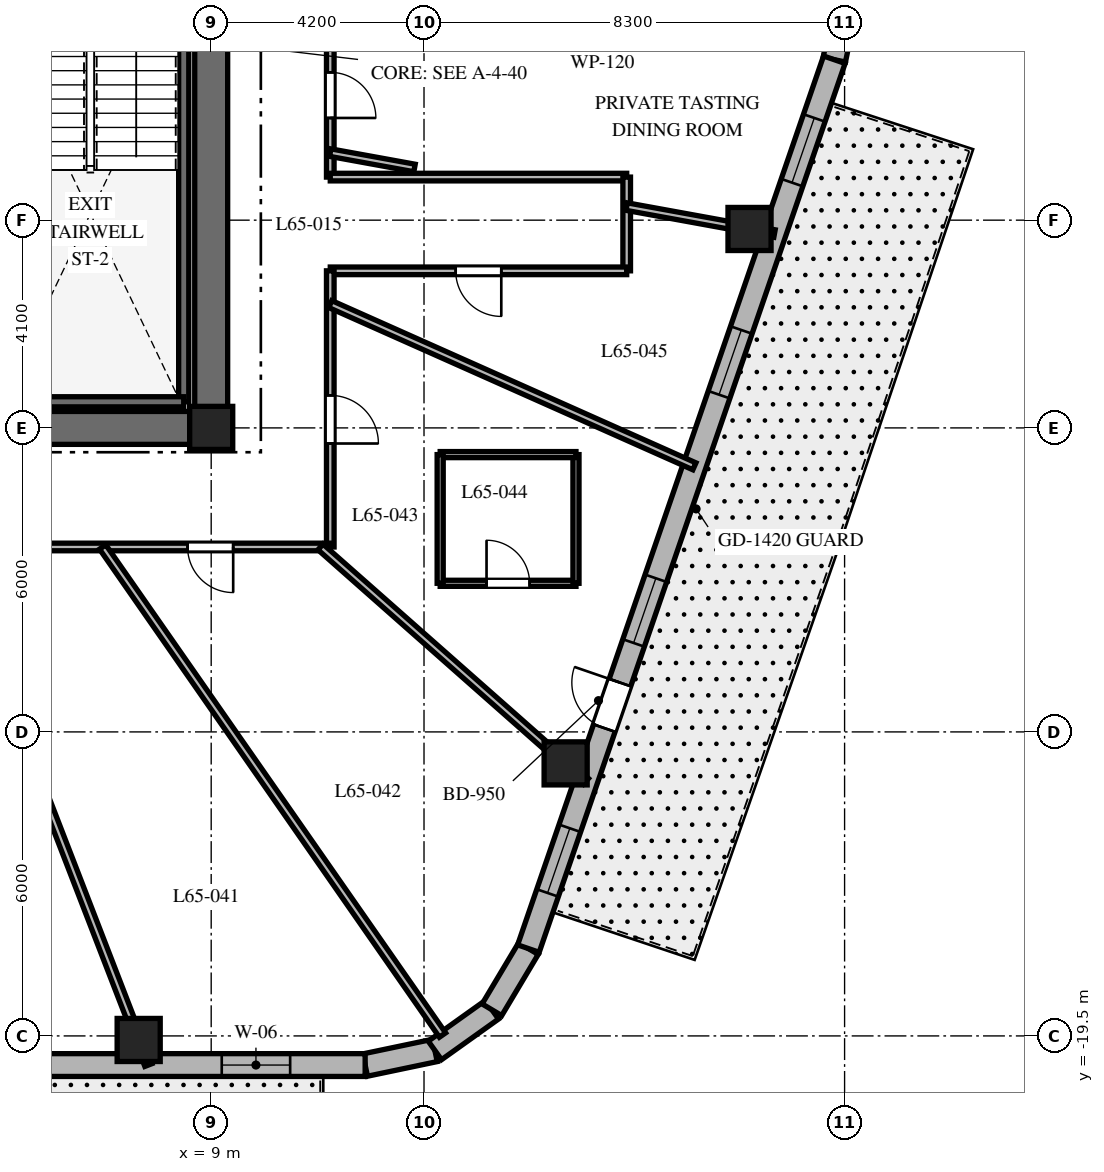
"""IFC4 building model, lengths in metres.
Left out: names, types, materials, properties, quantities, classifications, styles, units other than length and angle.
Written with IfcOpenShell. Run it as: python <this file> out.ifc"""

import sys

from ifc_helpers import new_model, si_unit, direction, frame, frame_2d, origin, origin_2d, place, context, subcontext, project, spatial, rectangle, extrude, element, fill, save


model = new_model("IFC4")
c1 = context("Model", 3, precision=1e-05, world=origin(), true_north=direction((0.0, 1.0)))
c2 = subcontext(c1, "Body", "Model", "MODEL_VIEW")
j1 = project(units=[si_unit("LENGTHUNIT", "METRE"), si_unit("PLANEANGLEUNIT", "RADIAN")], contexts=[c1])
p1 = place(None, origin())
s1 = spatial("IfcSite", under=j1, at=p1, CompositionType="ELEMENT")
p2 = place(p1, origin())
s2 = spatial("IfcBuilding", under=s1, at=p2, CompositionType="ELEMENT")
p3 = place(p2, frame((0.0, 0.0, 261.3)))
s3 = spatial("IfcBuildingStorey", under=s2, at=p3, CompositionType="ELEMENT", Elevation=261.3)
p4 = place(p3, frame((-9.325, -7.5, 0.0), z_axis=(0.0, 0.0, 1.0), x_axis=(1.0, 0.0, 0.0)))
e1 = element("IfcWall", 1, at=p4, inside=s3, PredefinedType="SHEAR", context=c2, shape_type="SweptSolid", body=[
    extrude(rectangle(XDim=18.65, YDim=0.65, at=frame_2d((9.325, 0.0))), origin(), (0.0, 0.0, 1.0), 3.9),
])
p5 = place(p4, frame((9.375, 0.0, 0.0)))
e2 = element("IfcOpeningElement", 2, at=p5, cuts=e1, PredefinedType="OPENING", context=c2, shape_type="SweptSolid", body=[
    extrude(rectangle(XDim=1.0, YDim=2.15, at=frame_2d((0.5, 1.075))), frame((0.0, 0.335, 0.0), z_axis=(0.0, -1.0, 0.0), x_axis=(1.0, 0.0, 0.0)), (0.0, 0.0, 1.0), 0.67),
])
p6 = place(p3, frame((9.0, -7.175, 0.0), z_axis=(0.0, 0.0, 1.0), x_axis=(0.0, 1.0, 0.0)))
e3 = element("IfcWall", 3, at=p6, inside=s3, PredefinedType="SHEAR", context=c2, shape_type="SweptSolid", body=[
    extrude(rectangle(XDim=14.35, YDim=0.65, at=frame_2d((7.175, 0.0))), origin(), (0.0, 0.0, 1.0), 3.9),
])
p7 = place(p6, frame((10.3, 0.0, 0.0)))
e4 = element("IfcOpeningElement", 4, at=p7, cuts=e3, PredefinedType="OPENING", context=c2, shape_type="SweptSolid", body=[
    extrude(rectangle(XDim=1.05, YDim=2.15, at=frame_2d((0.525, 1.075))), frame((0.0, 0.335, 0.0), z_axis=(0.0, -1.0, 0.0), x_axis=(1.0, 0.0, 0.0)), (0.0, 0.0, 1.0), 0.67),
])
p8 = place(p3, frame((8.458, -6.985, 0.0), z_axis=(0.0, 0.0, 1.0), x_axis=(0.0, 1.0, 0.0)))
e5 = element("IfcWall", 5, at=p8, inside=s3, PredefinedType="SHEAR", context=c2, shape_type="SweptSolid", body=[
    extrude(rectangle(XDim=9.143, YDim=0.2, at=frame_2d((4.572, 0.0))), origin(), (0.0, 0.0, 1.0), 3.9),
])
p9 = place(p3, frame((4.772, -6.985, 0.0), z_axis=(0.0, 0.0, 1.0), x_axis=(1.0, 0.0, 0.0)))
e6 = element("IfcWall", 6, at=p9, inside=s3, PredefinedType="SHEAR", context=c2, shape_type="SweptSolid", body=[
    extrude(rectangle(XDim=3.686, YDim=0.2, at=frame_2d((1.843, 0.0))), origin(), (0.0, 0.0, 1.0), 3.9),
])
for number, where, z_axis, x_axis in (
    (7, (9.0, -7.5, 0.0), (0.0, 0.0, 1.0), (1.0, 0.0, 0.0)),
    (8, (7.569, -19.58, 0.0), (0.0, 0.0, 1.0), (1.0, 0.0, 0.0)),
    (9, (15.995, -14.121, 0.0), (0.0, 0.0, 1.0), (1.0, 0.0, 0.0)),
    (10, (19.624, -3.574, 0.0), (0.0, 0.0, 1.0), (1.0, 0.0, 0.0)),
):
    element("IfcColumn", number, at=place(p3, frame(where, z_axis=z_axis, x_axis=x_axis)), inside=s3, PredefinedType="COLUMN", context=c2, shape_type="SweptSolid", body=[
        extrude(rectangle(XDim=0.85, YDim=0.85, at=origin_2d()), origin(), (0.0, 0.0, 1.0), 3.9),
    ])
p10 = place(p3, frame((12.038, -20.075, 0.0), z_axis=(0.0, 0.0, 1.0), x_axis=(0.978750122553, 0.205056571711, 0.0)))
e11 = element("IfcWall", 11, at=p10, inside=s3, PredefinedType="SOLIDWALL", context=c2, shape_type="SweptSolid", body=[
    extrude(rectangle(XDim=1.406, YDim=0.45, at=frame_2d((0.703, 0.0))), origin(), (0.0, 0.0, 1.0), 3.6),
])
p11 = place(p3, frame((13.415, -19.787, 0.0), z_axis=(0.0, 0.0, 1.0), x_axis=(0.814055493997, 0.580787097561, 0.0)))
e12 = element("IfcWall", 12, at=p11, inside=s3, PredefinedType="SOLIDWALL", context=c2, shape_type="SweptSolid", body=[
    extrude(rectangle(XDim=1.383, YDim=0.45, at=frame_2d((0.691, 0.0))), origin(), (0.0, 0.0, 1.0), 3.6),
])
p12 = place(p3, frame((14.54, -18.984, 0.0), z_axis=(0.0, 0.0, 1.0), x_axis=(0.512374906623, 0.858761873317, 0.0)))
e13 = element("IfcWall", 13, at=p12, inside=s3, PredefinedType="SOLIDWALL", context=c2, shape_type="SweptSolid", body=[
    extrude(rectangle(XDim=1.406, YDim=0.45, at=frame_2d((0.703, 0.0))), origin(), (0.0, 0.0, 1.0), 3.6),
])
p13 = place(p3, frame((21.298, -0.233, 0.0), z_axis=(0.0, 0.0, 1.0), x_axis=(0.199158176661, 0.979967356941, 0.0)))
e14 = element("IfcWall", 14, at=p13, inside=s3, PredefinedType="SOLIDWALL", context=c2, shape_type="SweptSolid", body=[
    extrude(rectangle(XDim=0.895, YDim=0.45, at=frame_2d((0.447, 0.0))), origin(), (0.0, 0.0, 1.0), 3.6),
])
p14 = place(p3, frame((-10.379, -20.075, 0.0), z_axis=(0.0, 0.0, 1.0), x_axis=(1.0, 0.0, 0.0)))
e15 = element("IfcWall", 15, at=p14, inside=s3, PredefinedType="SOLIDWALL", context=c2, shape_type="SweptSolid", body=[
    extrude(rectangle(XDim=22.417, YDim=0.45, at=frame_2d((11.208, 0.0))), origin(), (0.0, 0.0, 1.0), 3.6),
])
p15 = place(p14, frame((2.302, 0.0, 0.0)))
e16 = element("IfcOpeningElement", 16, at=p15, cuts=e15, PredefinedType="OPENING", context=c2, shape_type="SweptSolid", body=[
    extrude(rectangle(XDim=1.0, YDim=2.15, at=frame_2d((0.5, 1.075))), frame((0.0, 0.235, 0.0), z_axis=(0.0, -1.0, 0.0), x_axis=(1.0, 0.0, 0.0)), (0.0, 0.0, 1.0), 0.47),
])
p16 = place(p14, frame((7.022, 0.0, 0.8)))
e17 = element("IfcOpeningElement", 17, at=p16, cuts=e15, PredefinedType="OPENING", context=c2, shape_type="SweptSolid", body=[
    extrude(rectangle(XDim=1.35, YDim=1.75, at=frame_2d((0.675, 0.875))), frame((0.0, 0.235, 0.0), z_axis=(0.0, -1.0, 0.0), x_axis=(1.0, 0.0, 0.0)), (0.0, 0.0, 1.0), 0.47),
])
p17 = place(p14, frame((13.18, 0.0, 0.8)))
e18 = element("IfcOpeningElement", 18, at=p17, cuts=e15, PredefinedType="OPENING", context=c2, shape_type="SweptSolid", body=[
    extrude(rectangle(XDim=1.35, YDim=1.75, at=frame_2d((0.675, 0.875))), frame((0.0, 0.235, 0.0), z_axis=(0.0, -1.0, 0.0), x_axis=(1.0, 0.0, 0.0)), (0.0, 0.0, 1.0), 0.47),
])
p18 = place(p14, frame((19.587, 0.0, 0.8)))
e19 = element("IfcOpeningElement", 19, at=p18, cuts=e15, PredefinedType="OPENING", context=c2, shape_type="SweptSolid", body=[
    extrude(rectangle(XDim=1.35, YDim=1.75, at=frame_2d((0.675, 0.875))), frame((0.0, 0.235, 0.0), z_axis=(0.0, -1.0, 0.0), x_axis=(1.0, 0.0, 0.0)), (0.0, 0.0, 1.0), 0.47),
])
p19 = place(p3, frame((15.26, -17.776, 0.0), z_axis=(0.0, 0.0, 1.0), x_axis=(0.325407437101, 0.945573899745, 0.0)))
e20 = element("IfcWall", 20, at=p19, inside=s3, PredefinedType="SOLIDWALL", context=c2, shape_type="SweptSolid", body=[
    extrude(rectangle(XDim=18.552, YDim=0.45, at=frame_2d((9.276, 0.0))), origin(), (0.0, 0.0, 1.0), 3.6),
])
p20 = place(p19, frame((4.602, 0.0, 0.0)))
e21 = element("IfcOpeningElement", 21, at=p20, cuts=e20, PredefinedType="OPENING", context=c2, shape_type="SweptSolid", body=[
    extrude(rectangle(XDim=0.95, YDim=2.15, at=frame_2d((0.475, 1.075))), frame((0.0, 0.235, 0.0), z_axis=(0.0, -1.0, 0.0), x_axis=(1.0, 0.0, 0.0)), (0.0, 0.0, 1.0), 0.47),
])
p21 = place(p19, frame((1.161, 0.0, 0.8)))
e22 = element("IfcOpeningElement", 22, at=p21, cuts=e20, PredefinedType="OPENING", context=c2, shape_type="SweptSolid", body=[
    extrude(rectangle(XDim=1.35, YDim=1.75, at=frame_2d((0.675, 0.875))), frame((0.0, 0.235, 0.0), z_axis=(0.0, -1.0, 0.0), x_axis=(1.0, 0.0, 0.0)), (0.0, 0.0, 1.0), 0.47),
])
p22 = place(p19, frame((6.379, 0.0, 0.8)))
e23 = element("IfcOpeningElement", 23, at=p22, cuts=e20, PredefinedType="OPENING", context=c2, shape_type="SweptSolid", body=[
    extrude(rectangle(XDim=1.35, YDim=1.75, at=frame_2d((0.675, 0.875))), frame((0.0, 0.235, 0.0), z_axis=(0.0, -1.0, 0.0), x_axis=(1.0, 0.0, 0.0)), (0.0, 0.0, 1.0), 0.47),
])
p23 = place(p19, frame((11.561, 0.0, 0.8)))
e24 = element("IfcOpeningElement", 24, at=p23, cuts=e20, PredefinedType="OPENING", context=c2, shape_type="SweptSolid", body=[
    extrude(rectangle(XDim=1.35, YDim=1.75, at=frame_2d((0.675, 0.875))), frame((0.0, 0.235, 0.0), z_axis=(0.0, -1.0, 0.0), x_axis=(1.0, 0.0, 0.0)), (0.0, 0.0, 1.0), 0.47),
])
p24 = place(p19, frame((15.987, 0.0, 0.8)))
e25 = element("IfcOpeningElement", 25, at=p24, cuts=e20, PredefinedType="OPENING", context=c2, shape_type="SweptSolid", body=[
    extrude(rectangle(XDim=1.35, YDim=1.75, at=frame_2d((0.675, 0.875))), frame((0.0, 0.235, 0.0), z_axis=(0.0, -1.0, 0.0), x_axis=(1.0, 0.0, 0.0)), (0.0, 0.0, 1.0), 0.47),
])
p25 = place(p3, frame((11.35, 9.85, 0.0), z_axis=(0.0, 0.0, 1.0), x_axis=(0.0, -1.0, 0.0)))
e26 = element("IfcWall", 26, at=p25, inside=s3, PredefinedType="PARTITIONING", context=c2, shape_type="SweptSolid", body=[
    extrude(rectangle(XDim=12.4, YDim=0.15, at=frame_2d((6.2, 0.0))), origin(), (0.0, 0.0, 1.0), 3.09),
])
p26 = place(p25, frame((7.697, 0.0, 0.0)))
e27 = element("IfcOpeningElement", 27, at=p26, cuts=e26, PredefinedType="OPENING", context=c2, shape_type="SweptSolid", body=[
    extrude(rectangle(XDim=0.95, YDim=2.03, at=frame_2d((0.475, 1.015))), frame((0.0, 0.085, 0.0), z_axis=(0.0, -1.0, 0.0), x_axis=(1.0, 0.0, 0.0)), (0.0, 0.0, 1.0), 0.17),
])
p27 = place(p25, frame((2.973, 0.0, 0.0)))
e28 = element("IfcOpeningElement", 28, at=p27, cuts=e26, PredefinedType="OPENING", context=c2, shape_type="SweptSolid", body=[
    extrude(rectangle(XDim=1.0, YDim=2.03, at=frame_2d((0.5, 1.015))), frame((0.0, 0.085, 0.0), z_axis=(0.0, -1.0, 0.0), x_axis=(1.0, 0.0, 0.0)), (0.0, 0.0, 1.0), 0.17),
])
p28 = place(p25, frame((10.333, 0.0, 0.0)))
e29 = element("IfcOpeningElement", 29, at=p28, cuts=e26, PredefinedType="OPENING", context=c2, shape_type="SweptSolid", body=[
    extrude(rectangle(XDim=0.9, YDim=2.03, at=frame_2d((0.45, 1.015))), frame((0.0, 0.085, 0.0), z_axis=(0.0, -1.0, 0.0), x_axis=(1.0, 0.0, 0.0)), (0.0, 0.0, 1.0), 0.17),
])
p29 = place(p3, frame((11.35, -2.55, 0.0), z_axis=(0.0, 0.0, 1.0), x_axis=(1.0, 0.0, 0.0)))
e30 = element("IfcWall", 30, at=p29, inside=s3, PredefinedType="PARTITIONING", context=c2, shape_type="SweptSolid", body=[
    extrude(rectangle(XDim=5.85, YDim=0.15, at=frame_2d((2.925, 0.0))), origin(), (0.0, 0.0, 1.0), 3.041),
])
p30 = place(p3, frame((17.2, -2.55, 0.0), z_axis=(0.0, 0.0, 1.0), x_axis=(0.0, -1.0, 0.0)))
e31 = element("IfcWall", 31, at=p30, inside=s3, PredefinedType="PARTITIONING", context=c2, shape_type="SweptSolid", body=[
    extrude(rectangle(XDim=1.85, YDim=0.15, at=frame_2d((0.925, 0.0))), origin(), (0.0, 0.0, 1.0), 3.09),
])
p31 = place(p3, frame((17.2, -4.4, 0.0), z_axis=(0.0, 0.0, 1.0), x_axis=(-1.0, 0.0, 0.0)))
e32 = element("IfcWall", 32, at=p31, inside=s3, PredefinedType="PARTITIONING", context=c2, shape_type="SweptSolid", body=[
    extrude(rectangle(XDim=5.85, YDim=0.15, at=frame_2d((2.925, 0.0))), origin(), (0.0, 0.0, 1.0), 3.041),
])
p32 = place(p31, frame((2.475, 0.0, 0.0)))
e33 = element("IfcOpeningElement", 33, at=p32, cuts=e32, PredefinedType="OPENING", context=c2, shape_type="SweptSolid", body=[
    extrude(rectangle(XDim=0.9, YDim=2.03, at=frame_2d((0.45, 1.015))), frame((0.0, 0.085, 0.0), z_axis=(0.0, -1.0, 0.0), x_axis=(1.0, 0.0, 0.0)), (0.0, 0.0, 1.0), 0.17),
])
p33 = place(p3, frame((11.35, -4.4, 0.0), z_axis=(0.0, 0.0, 1.0), x_axis=(0.0, -1.0, 0.0)))
e34 = element("IfcWall", 34, at=p33, inside=s3, PredefinedType="PARTITIONING", context=c2, shape_type="SweptSolid", body=[
    extrude(rectangle(XDim=5.45, YDim=0.15, at=frame_2d((2.725, 0.0))), origin(), (0.0, 0.0, 1.0), 3.09),
])
p34 = place(p33, frame((2.458, 0.0, 0.0)))
e35 = element("IfcOpeningElement", 35, at=p34, cuts=e34, PredefinedType="OPENING", context=c2, shape_type="SweptSolid", body=[
    extrude(rectangle(XDim=0.95, YDim=2.03, at=frame_2d((0.475, 1.015))), frame((0.0, 0.085, 0.0), z_axis=(0.0, -1.0, 0.0), x_axis=(1.0, 0.0, 0.0)), (0.0, 0.0, 1.0), 0.17),
])
p35 = place(p3, frame((11.35, -9.85, 0.0), z_axis=(0.0, 0.0, 1.0), x_axis=(-1.0, 0.0, 0.0)))
e36 = element("IfcWall", 36, at=p35, inside=s3, PredefinedType="PARTITIONING", context=c2, shape_type="SweptSolid", body=[
    extrude(rectangle(XDim=10.43, YDim=0.15, at=frame_2d((5.215, 0.0))), origin(), (0.0, 0.0, 1.0), 3.09),
])
p36 = place(p35, frame((8.382, 0.0, 0.0)))
e37 = element("IfcOpeningElement", 37, at=p36, cuts=e36, PredefinedType="OPENING", context=c2, shape_type="SweptSolid", body=[
    extrude(rectangle(XDim=0.95, YDim=2.03, at=frame_2d((0.475, 1.015))), frame((0.0, 0.085, 0.0), z_axis=(0.0, -1.0, 0.0), x_axis=(1.0, 0.0, 0.0)), (0.0, 0.0, 1.0), 0.17),
])
p37 = place(p35, frame((5.541, 0.0, 0.0)))
e38 = element("IfcOpeningElement", 38, at=p37, cuts=e36, PredefinedType="OPENING", context=c2, shape_type="SweptSolid", body=[
    extrude(rectangle(XDim=0.9, YDim=2.03, at=frame_2d((0.45, 1.015))), frame((0.0, 0.085, 0.0), z_axis=(0.0, -1.0, 0.0), x_axis=(1.0, 0.0, 0.0)), (0.0, 0.0, 1.0), 0.17),
])
p38 = place(p35, frame((1.916, 0.0, 0.0)))
e39 = element("IfcOpeningElement", 39, at=p38, cuts=e36, PredefinedType="OPENING", context=c2, shape_type="SweptSolid", body=[
    extrude(rectangle(XDim=0.9, YDim=2.03, at=frame_2d((0.45, 1.015))), frame((0.0, 0.085, 0.0), z_axis=(0.0, -1.0, 0.0), x_axis=(1.0, 0.0, 0.0)), (0.0, 0.0, 1.0), 0.17),
])
p39 = place(p3, frame((3.808, -9.85, 0.0), z_axis=(0.0, 0.0, 1.0), x_axis=(0.360587327934, -0.932725457427, 0.0)))
e40 = element("IfcWall", 40, at=p39, inside=s3, PredefinedType="PARTITIONING", context=c2, shape_type="SweptSolid", body=[
    extrude(rectangle(XDim=10.962, YDim=0.15, at=frame_2d((5.481, 0.0))), origin(), (0.0, 0.0, 1.0), 2.94),
])
p40 = place(p3, frame((6.858, -9.85, 0.0), z_axis=(0.0, 0.0, 1.0), x_axis=(0.571391702066, -0.820677477948, 0.0)))
e41 = element("IfcWall", 41, at=p40, inside=s3, PredefinedType="PARTITIONING", context=c2, shape_type="SweptSolid", body=[
    extrude(rectangle(XDim=11.738, YDim=0.15, at=frame_2d((5.869, 0.0))), origin(), (0.0, 0.0, 1.0), 2.94),
])
p41 = place(p3, frame((11.157, -9.85, 0.0), z_axis=(0.0, 0.0, 1.0), x_axis=(0.74966962095, -0.661812253909, 0.0)))
e42 = element("IfcWall", 42, at=p41, inside=s3, PredefinedType="PARTITIONING", context=c2, shape_type="SweptSolid", body=[
    extrude(rectangle(XDim=6.989, YDim=0.15, at=frame_2d((3.494, 0.0))), origin(), (0.0, 0.0, 1.0), 2.94),
])
p42 = place(p3, frame((11.35, -5.057, 0.0), z_axis=(0.0, 0.0, 1.0), x_axis=(0.91344644156, -0.406958964026, 0.0)))
e43 = element("IfcWall", 43, at=p42, inside=s3, PredefinedType="PARTITIONING", context=c2, shape_type="SweptSolid", body=[
    extrude(rectangle(XDim=7.867, YDim=0.15, at=frame_2d((3.933, 0.0))), origin(), (0.0, 0.0, 1.0), 2.94),
])
p43 = place(p3, frame((11.35, -2.067, 0.0), z_axis=(0.0, 0.0, 1.0), x_axis=(0.983807459651, -0.179228575665, 0.0)))
e44 = element("IfcWall", 44, at=p43, inside=s3, PredefinedType="PARTITIONING", context=c2, shape_type="SweptSolid", body=[
    extrude(rectangle(XDim=1.69, YDim=0.15, at=frame_2d((0.845, 0.0))), origin(), (0.0, 0.0, 1.0), 3.6),
])
p44 = place(p3, frame((17.2, -3.133, 0.0), z_axis=(0.0, 0.0, 1.0), x_axis=(0.983817168797, -0.179175272791, 0.0)))
e45 = element("IfcWall", 45, at=p44, inside=s3, PredefinedType="PARTITIONING", context=c2, shape_type="SweptSolid", body=[
    extrude(rectangle(XDim=2.965, YDim=0.15, at=frame_2d((1.482, 0.0))), origin(), (0.0, 0.0, 1.0), 2.94),
])
p45 = place(p3, frame((13.519, -10.567, 0.0), z_axis=(0.0, 0.0, 1.0), x_axis=(1.0, 0.0, 0.0)))
e46 = element("IfcWall", 46, at=p45, inside=s3, PredefinedType="PARTITIONING", context=c2, shape_type="SweptSolid", body=[
    extrude(rectangle(XDim=2.68, YDim=0.12, at=frame_2d((1.34, 0.0))), origin(), (0.0, 0.0, 1.0), 3.172),
])
p46 = place(p45, frame((0.915, 0.0, 0.0)))
e47 = element("IfcOpeningElement", 47, at=p46, cuts=e46, PredefinedType="OPENING", context=c2, shape_type="SweptSolid", body=[
    extrude(rectangle(XDim=0.85, YDim=2.03, at=frame_2d((0.425, 1.015))), frame((0.0, 0.07, 0.0), z_axis=(0.0, -1.0, 0.0), x_axis=(1.0, 0.0, 0.0)), (0.0, 0.0, 1.0), 0.14),
])
p47 = place(p3, frame((16.199, -10.567, 0.0), z_axis=(0.0, 0.0, 1.0), x_axis=(0.0, 1.0, 0.0)))
e48 = element("IfcWall", 48, at=p47, inside=s3, PredefinedType="PARTITIONING", context=c2, shape_type="SweptSolid", body=[
    extrude(rectangle(XDim=2.54, YDim=0.12, at=frame_2d((1.27, 0.0))), origin(), (0.0, 0.0, 1.0), 3.6),
])
p48 = place(p3, frame((16.199, -8.027, 0.0), z_axis=(0.0, 0.0, 1.0), x_axis=(-1.0, 0.0, 0.0)))
e49 = element("IfcWall", 49, at=p48, inside=s3, PredefinedType="PARTITIONING", context=c2, shape_type="SweptSolid", body=[
    extrude(rectangle(XDim=2.68, YDim=0.12, at=frame_2d((1.34, 0.0))), origin(), (0.0, 0.0, 1.0), 3.172),
])
p49 = place(p3, frame((13.519, -8.027, 0.0), z_axis=(0.0, 0.0, 1.0), x_axis=(0.0, -1.0, 0.0)))
e50 = element("IfcWall", 50, at=p49, inside=s3, PredefinedType="PARTITIONING", context=c2, shape_type="SweptSolid", body=[
    extrude(rectangle(XDim=2.54, YDim=0.12, at=frame_2d((1.27, 0.0))), origin(), (0.0, 0.0, 1.0), 3.6),
])
p50 = place(p18, origin())
e51 = element("IfcWindow", 51, at=p50, inside=s3, PartitioningType="SINGLE_PANEL", PredefinedType="WINDOW", context=c2, shape_type="SweptSolid", body=[
    extrude(rectangle(XDim=1.35, YDim=1.75, at=frame_2d((0.675, 0.875))), frame((0.0, 0.03, 0.0), z_axis=(0.0, -1.0, 0.0), x_axis=(1.0, 0.0, 0.0)), (0.0, 0.0, 1.0), 0.06),
])
fill(e19, e51)
p51 = place(p20, origin())
e52 = element("IfcDoor", 52, at=p51, inside=s3, OperationType="SINGLE_SWING_RIGHT", PredefinedType="DOOR", context=c2, shape_type="SweptSolid", body=[
    extrude(rectangle(XDim=0.95, YDim=2.15, at=frame_2d((0.475, 1.075))), frame((0.0, 0.025, 0.0), z_axis=(0.0, -1.0, 0.0), x_axis=(1.0, 0.0, 0.0)), (0.0, 0.0, 1.0), 0.05),
])
fill(e21, e52)
p52 = place(p21, origin())
e53 = element("IfcWindow", 53, at=p52, inside=s3, PartitioningType="SINGLE_PANEL", PredefinedType="WINDOW", context=c2, shape_type="SweptSolid", body=[
    extrude(rectangle(XDim=1.35, YDim=1.75, at=frame_2d((0.675, 0.875))), frame((0.0, 0.03, 0.0), z_axis=(0.0, -1.0, 0.0), x_axis=(1.0, 0.0, 0.0)), (0.0, 0.0, 1.0), 0.06),
])
fill(e22, e53)
p53 = place(p22, origin())
e54 = element("IfcWindow", 54, at=p53, inside=s3, PartitioningType="SINGLE_PANEL", PredefinedType="WINDOW", context=c2, shape_type="SweptSolid", body=[
    extrude(rectangle(XDim=1.35, YDim=1.75, at=frame_2d((0.675, 0.875))), frame((0.0, 0.03, 0.0), z_axis=(0.0, -1.0, 0.0), x_axis=(1.0, 0.0, 0.0)), (0.0, 0.0, 1.0), 0.06),
])
fill(e23, e54)
p54 = place(p23, origin())
e55 = element("IfcWindow", 55, at=p54, inside=s3, PartitioningType="SINGLE_PANEL", PredefinedType="WINDOW", context=c2, shape_type="SweptSolid", body=[
    extrude(rectangle(XDim=1.35, YDim=1.75, at=frame_2d((0.675, 0.875))), frame((0.0, 0.03, 0.0), z_axis=(0.0, -1.0, 0.0), x_axis=(1.0, 0.0, 0.0)), (0.0, 0.0, 1.0), 0.06),
])
fill(e24, e55)
p55 = place(p24, origin())
e56 = element("IfcWindow", 56, at=p55, inside=s3, PartitioningType="SINGLE_PANEL", PredefinedType="WINDOW", context=c2, shape_type="SweptSolid", body=[
    extrude(rectangle(XDim=1.35, YDim=1.75, at=frame_2d((0.675, 0.875))), frame((0.0, 0.03, 0.0), z_axis=(0.0, -1.0, 0.0), x_axis=(1.0, 0.0, 0.0)), (0.0, 0.0, 1.0), 0.06),
])
fill(e25, e56)
p56 = place(p38, origin())
e57 = element("IfcDoor", 57, at=p56, inside=s3, OperationType="SINGLE_SWING_LEFT", PredefinedType="DOOR", context=c2, shape_type="SweptSolid", body=[
    extrude(rectangle(XDim=0.9, YDim=2.03, at=frame_2d((0.45, 1.015))), frame((0.0, 0.025, 0.0), z_axis=(0.0, -1.0, 0.0), x_axis=(1.0, 0.0, 0.0)), (0.0, 0.0, 1.0), 0.05),
])
fill(e39, e57)
p57 = place(p34, origin())
e58 = element("IfcDoor", 58, at=p57, inside=s3, OperationType="SINGLE_SWING_RIGHT", PredefinedType="DOOR", context=c2, shape_type="SweptSolid", body=[
    extrude(rectangle(XDim=0.95, YDim=2.03, at=frame_2d((0.475, 1.015))), frame((0.0, 0.025, 0.0), z_axis=(0.0, -1.0, 0.0), x_axis=(1.0, 0.0, 0.0)), (0.0, 0.0, 1.0), 0.05),
])
fill(e35, e58)
p58 = place(p46, origin())
e59 = element("IfcDoor", 59, at=p58, inside=s3, OperationType="SINGLE_SWING_LEFT", PredefinedType="DOOR", context=c2, shape_type="SweptSolid", body=[
    extrude(rectangle(XDim=0.85, YDim=2.03, at=frame_2d((0.425, 1.015))), frame((0.0, 0.025, 0.0), z_axis=(0.0, -1.0, 0.0), x_axis=(1.0, 0.0, 0.0)), (0.0, 0.0, 1.0), 0.05),
])
fill(e47, e59)
p59 = place(p32, origin())
e60 = element("IfcDoor", 60, at=p59, inside=s3, OperationType="SINGLE_SWING_LEFT", PredefinedType="DOOR", context=c2, shape_type="SweptSolid", body=[
    extrude(rectangle(XDim=0.9, YDim=2.03, at=frame_2d((0.45, 1.015))), frame((0.0, 0.025, 0.0), z_axis=(0.0, -1.0, 0.0), x_axis=(1.0, 0.0, 0.0)), (0.0, 0.0, 1.0), 0.05),
])
fill(e33, e60)
p60 = place(p28, origin())
e61 = element("IfcDoor", 61, at=p60, inside=s3, OperationType="SINGLE_SWING_RIGHT", PredefinedType="DOOR", context=c2, shape_type="SweptSolid", body=[
    extrude(rectangle(XDim=0.9, YDim=2.03, at=frame_2d((0.45, 1.015))), frame((0.0, 0.025, 0.0), z_axis=(0.0, -1.0, 0.0), x_axis=(1.0, 0.0, 0.0)), (0.0, 0.0, 1.0), 0.05),
])
fill(e29, e61)
save(model, sys.argv[1])
